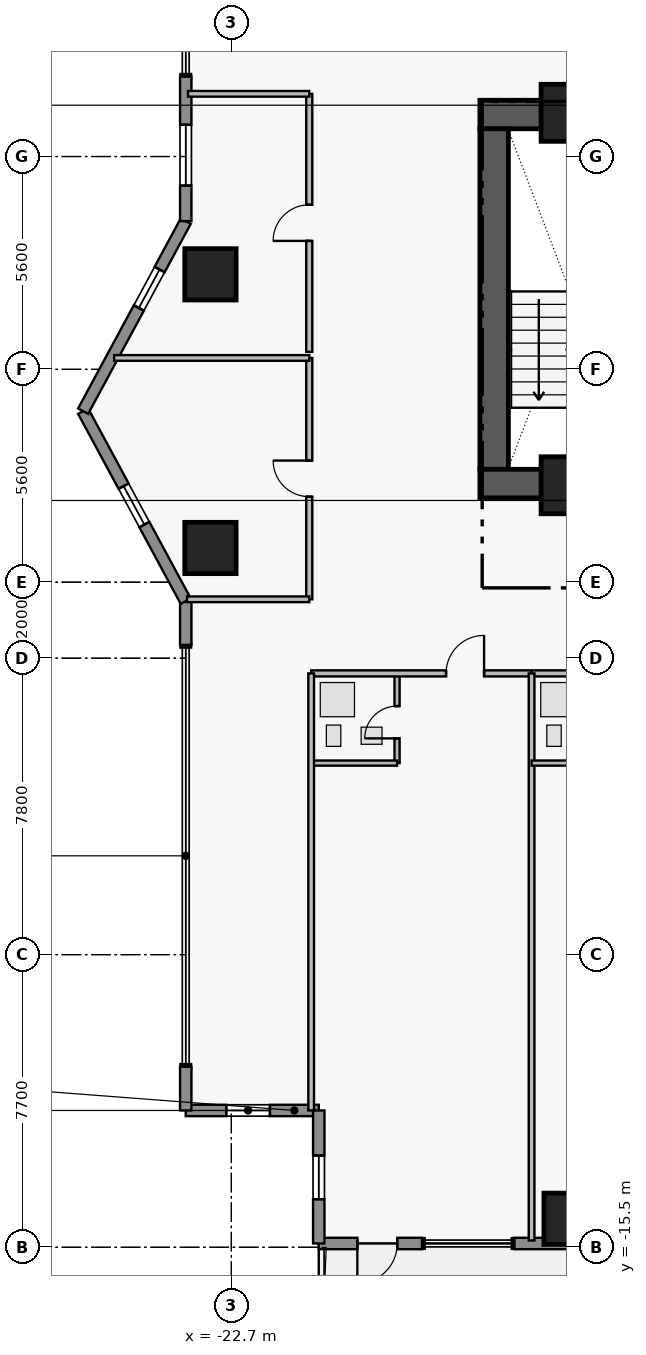
"""IFC4 building model, lengths in metres.
Left out: names, types, materials, properties, quantities, classifications, styles, units other than length and angle.
Written with IfcOpenShell. Run it as: python <this file> out.ifc"""

import sys

from ifc_helpers import new_model, si_unit, direction, frame, frame_2d, origin, origin_2d, place, context, subcontext, project, spatial, rectangle, extrude, element, fill, save


model = new_model("IFC4")
c1 = context("Model", 3, precision=1e-05, world=origin(), true_north=direction((0.0, 1.0)))
c2 = subcontext(c1, "Body", "Model", "MODEL_VIEW")
j1 = project(units=[si_unit("LENGTHUNIT", "METRE"), si_unit("PLANEANGLEUNIT", "RADIAN")], contexts=[c1])
p1 = place(None, origin())
s1 = spatial("IfcSite", under=j1, at=p1, CompositionType="ELEMENT")
p2 = place(p1, origin())
s2 = spatial("IfcBuilding", under=s1, at=p2, CompositionType="ELEMENT")
p3 = place(p2, frame((0.0, 0.0, 150.4)))
s3 = spatial("IfcBuildingStorey", under=s2, at=p3, CompositionType="ELEMENT", Elevation=150.4)
p4 = place(p3, frame((-16.16, 14.305, 0.0), z_axis=(0.0, 0.0, 1.0), x_axis=(1.0, 0.0, 0.0)))
e1 = element("IfcWall", 1, at=p4, inside=s3, PredefinedType="SHEAR", context=c2, shape_type="SweptSolid", body=[
    extrude(rectangle(XDim=4.56, YDim=0.75, at=frame_2d((2.28, 0.0))), origin(), (0.0, 0.0, 1.0), 3.46),
])
p5 = place(p3, frame((-15.785, 4.97, 0.0), z_axis=(0.0, 0.0, 1.0), x_axis=(0.0, 1.0, 0.0)))
e2 = element("IfcWall", 2, at=p5, inside=s3, PredefinedType="SHEAR", context=c2, shape_type="SweptSolid", body=[
    extrude(rectangle(XDim=8.96, YDim=0.75, at=frame_2d((4.48, 0.0))), origin(), (0.0, 0.0, 1.0), 3.46),
])
p6 = place(p3, frame((-16.16, 4.595, 0.0), z_axis=(0.0, 0.0, 1.0), x_axis=(1.0, 0.0, 0.0)))
e3 = element("IfcWall", 3, at=p6, inside=s3, PredefinedType="SHEAR", context=c2, shape_type="SweptSolid", body=[
    extrude(rectangle(XDim=4.56, YDim=0.75, at=frame_2d((2.28, 0.0))), origin(), (0.0, 0.0, 1.0), 3.46),
])
for number, where, z_axis, x_axis in (
    (4, (-13.8, 14.35, 0.0), (0.0, 0.0, 1.0), (1.0, 0.0, 0.0)),
    (5, (-13.8, 4.55, 0.0), (0.0, 0.0, 1.0), (1.0, 0.0, 0.0)),
):
    element("IfcColumn", number, at=place(p3, frame(where, z_axis=z_axis, x_axis=x_axis)), inside=s3, PredefinedType="COLUMN", context=c2, shape_type="SweptSolid", body=[
        extrude(rectangle(XDim=1.5, YDim=1.5, at=origin_2d()), origin(), (0.0, 0.0, 1.0), 3.65),
    ])
for number, where, z_axis, x_axis in (
    (6, (-13.8, -14.75, 0.0), (0.0, 0.0, 1.0), (1.0, 0.0, 0.0)),
    (7, (-23.25, 2.9, 0.0), (0.0, 0.0, 1.0), (1.0, 0.0, 0.0)),
    (8, (-23.25, 10.1, 0.0), (0.0, 0.0, 1.0), (1.0, 0.0, 0.0)),
):
    element("IfcColumn", number, at=place(p3, frame(where, z_axis=z_axis, x_axis=x_axis)), inside=s3, PredefinedType="COLUMN", context=c2, shape_type="SweptSolid", body=[
        extrude(rectangle(XDim=1.35, YDim=1.35, at=origin_2d()), origin(), (0.0, 0.0, 1.0), 3.65),
    ])
p7 = place(p3, frame((-20.4, -11.9, 0.0), z_axis=(0.0, 0.0, 1.0), x_axis=(-1.0, 0.0, 0.0)))
e9 = element("IfcWall", 9, at=p7, inside=s3, PredefinedType="STANDARD", context=c2, shape_type="SweptSolid", body=[
    extrude(rectangle(XDim=3.5, YDim=0.3, at=frame_2d((1.75, 0.0))), origin(), (0.0, 0.0, 1.0), 3.43),
])
p8 = place(p7, frame((1.285, 0.0, 1.25)))
e10 = element("IfcOpeningElement", 10, at=p8, cuts=e9, PredefinedType="OPENING", context=c2, shape_type="SweptSolid", body=[
    extrude(rectangle(XDim=1.15, YDim=1.55, at=frame_2d((0.575, 0.775))), frame((0.0, 0.16, 0.0), z_axis=(0.0, -1.0, 0.0), x_axis=(1.0, 0.0, 0.0)), (0.0, 0.0, 1.0), 0.32),
])
for number, where, z_axis, x_axis in (
    (11, (-23.9, -11.9, 0.0), (0.0, 0.0, 1.0), (0.0, 1.0, 0.0)),
    (12, (-23.9, 0.35, 0.0), (0.0, 0.0, 1.0), (0.0, 1.0, 0.0)),
):
    element("IfcWall", number, at=place(p3, frame(where, z_axis=z_axis, x_axis=x_axis)), inside=s3, PredefinedType="STANDARD", context=c2, shape_type="SweptSolid", body=[
        extrude(rectangle(XDim=1.15, YDim=0.3, at=frame_2d((0.575, 0.0))), origin(), (0.0, 0.0, 1.0), 3.43),
    ])
p9 = place(p3, frame((-23.9, 1.5, 0.0), z_axis=(0.0, 0.0, 1.0), x_axis=(-0.475175525499, 0.879891027325, 0.0)))
e13 = element("IfcWall", 13, at=p9, inside=s3, PredefinedType="STANDARD", context=c2, shape_type="SweptSolid", body=[
    extrude(rectangle(XDim=5.683, YDim=0.3, at=frame_2d((2.841, 0.0))), origin(), (0.0, 0.0, 1.0), 3.43),
])
p10 = place(p9, frame((2.29, 0.0, 1.25)))
e14 = element("IfcOpeningElement", 14, at=p10, cuts=e13, PredefinedType="OPENING", context=c2, shape_type="SweptSolid", body=[
    extrude(rectangle(XDim=1.15, YDim=1.55, at=frame_2d((0.575, 0.775))), frame((0.0, 0.16, 0.0), z_axis=(0.0, -1.0, 0.0), x_axis=(1.0, 0.0, 0.0)), (0.0, 0.0, 1.0), 0.32),
])
p11 = place(p3, frame((-26.6, 6.5, 0.0), z_axis=(0.0, 0.0, 1.0), x_axis=(0.475175525499, 0.879891027325, 0.0)))
e15 = element("IfcWall", 15, at=p11, inside=s3, PredefinedType="STANDARD", context=c2, shape_type="SweptSolid", body=[
    extrude(rectangle(XDim=5.683, YDim=0.3, at=frame_2d((2.841, 0.0))), origin(), (0.0, 0.0, 1.0), 3.43),
])
p12 = place(p11, frame((3.086, 0.0, 1.25)))
e16 = element("IfcOpeningElement", 16, at=p12, cuts=e15, PredefinedType="OPENING", context=c2, shape_type="SweptSolid", body=[
    extrude(rectangle(XDim=1.15, YDim=1.55, at=frame_2d((0.575, 0.775))), frame((0.0, 0.16, 0.0), z_axis=(0.0, -1.0, 0.0), x_axis=(1.0, 0.0, 0.0)), (0.0, 0.0, 1.0), 0.32),
])
p13 = place(p3, frame((-23.9, 11.5, 0.0), z_axis=(0.0, 0.0, 1.0), x_axis=(0.0, 1.0, 0.0)))
e17 = element("IfcWall", 17, at=p13, inside=s3, PredefinedType="STANDARD", context=c2, shape_type="SweptSolid", body=[
    extrude(rectangle(XDim=3.8, YDim=0.3, at=frame_2d((1.9, 0.0))), origin(), (0.0, 0.0, 1.0), 3.43),
])
p14 = place(p13, frame((0.935, 0.0, 0.85)))
e18 = element("IfcOpeningElement", 18, at=p14, cuts=e17, PredefinedType="OPENING", context=c2, shape_type="SweptSolid", body=[
    extrude(rectangle(XDim=1.6, YDim=1.8, at=frame_2d((0.8, 0.9))), frame((0.0, 0.16, 0.0), z_axis=(0.0, -1.0, 0.0), x_axis=(1.0, 0.0, 0.0)), (0.0, 0.0, 1.0), 0.32),
])
p15 = place(p3, frame((-12.88, -15.4, 0.0), z_axis=(0.0, 0.0, 1.0), x_axis=(-1.0, 0.0, 0.0)))
e19 = element("IfcWall", 19, at=p15, inside=s3, PredefinedType="STANDARD", context=c2, shape_type="SweptSolid", body=[
    extrude(rectangle(XDim=2.37, YDim=0.3, at=frame_2d((1.185, 0.0))), origin(), (0.0, 0.0, 1.0), 3.43),
])
p16 = place(p3, frame((-17.685, -15.4, 0.0), z_axis=(0.0, 0.0, 1.0), x_axis=(-1.0, 0.0, 0.0)))
e20 = element("IfcWall", 20, at=p16, inside=s3, PredefinedType="STANDARD", context=c2, shape_type="SweptSolid", body=[
    extrude(rectangle(XDim=2.715, YDim=0.3, at=frame_2d((1.357, 0.0))), origin(), (0.0, 0.0, 1.0), 3.43),
])
p17 = place(p16, frame((0.65, 0.0, 0.0)))
e21 = element("IfcOpeningElement", 21, at=p17, cuts=e20, PredefinedType="OPENING", context=c2, shape_type="SweptSolid", body=[
    extrude(rectangle(XDim=1.05, YDim=2.2, at=frame_2d((0.525, 1.1))), frame((0.0, 0.16, 0.0), z_axis=(0.0, -1.0, 0.0), x_axis=(1.0, 0.0, 0.0)), (0.0, 0.0, 1.0), 0.32),
])
p18 = place(p3, frame((-20.4, -15.4, 0.0), z_axis=(0.0, 0.0, 1.0), x_axis=(0.0, 1.0, 0.0)))
e22 = element("IfcWall", 22, at=p18, inside=s3, PredefinedType="STANDARD", context=c2, shape_type="SweptSolid", body=[
    extrude(rectangle(XDim=3.5, YDim=0.3, at=frame_2d((1.75, 0.0))), origin(), (0.0, 0.0, 1.0), 3.43),
])
p19 = place(p18, frame((1.165, 0.0, 1.25)))
e23 = element("IfcOpeningElement", 23, at=p19, cuts=e22, PredefinedType="OPENING", context=c2, shape_type="SweptSolid", body=[
    extrude(rectangle(XDim=1.15, YDim=1.55, at=frame_2d((0.575, 0.775))), frame((0.0, 0.16, 0.0), z_axis=(0.0, -1.0, 0.0), x_axis=(1.0, 0.0, 0.0)), (0.0, 0.0, 1.0), 0.32),
])
p20 = place(p3, frame((-18.34, -2.76, 0.0), z_axis=(0.0, 0.0, 1.0), x_axis=(0.0, 1.0, 0.0)))
e24 = element("IfcWall", 24, at=p20, inside=s3, PredefinedType="PLUMBINGWALL", context=c2, shape_type="SweptSolid", body=[
    extrude(rectangle(XDim=2.36, YDim=0.135, at=frame_2d((1.18, 0.0))), origin(), (0.0, 0.0, 1.0), 3.43),
])
p21 = place(p20, frame((0.65, 0.0, 0.0)))
e25 = element("IfcOpeningElement", 25, at=p21, cuts=e24, PredefinedType="OPENING", context=c2, shape_type="SweptSolid", body=[
    extrude(rectangle(XDim=0.85, YDim=2.1, at=frame_2d((0.425, 1.05))), frame((0.0, 0.077, 0.0), z_axis=(0.0, -1.0, 0.0), x_axis=(1.0, 0.0, 0.0)), (0.0, 0.0, 1.0), 0.155),
])
p22 = place(p3, frame((-20.6, -0.4, 0.0), z_axis=(0.0, 0.0, 1.0), x_axis=(1.0, 0.0, 0.0)))
e26 = element("IfcWall", 26, at=p22, inside=s3, PredefinedType="PARTITIONING", context=c2, shape_type="SweptSolid", body=[
    extrude(rectangle(XDim=5.8, YDim=0.16, at=frame_2d((2.9, 0.0))), origin(), (0.0, 0.0, 1.0), 3.43),
])
p23 = place(p22, frame((3.55, 0.0, 0.0)))
e27 = element("IfcOpeningElement", 27, at=p23, cuts=e26, PredefinedType="OPENING", context=c2, shape_type="SweptSolid", body=[
    extrude(rectangle(XDim=1.0, YDim=2.15, at=frame_2d((0.5, 1.075))), frame((0.0, 0.09, 0.0), z_axis=(0.0, -1.0, 0.0), x_axis=(1.0, 0.0, 0.0)), (0.0, 0.0, 1.0), 0.18),
])
p24 = place(p3, frame((-14.8, -0.4, 0.0), z_axis=(0.0, 0.0, 1.0), x_axis=(1.0, 0.0, 0.0)))
e28 = element("IfcWall", 28, at=p24, inside=s3, PredefinedType="PARTITIONING", context=c2, shape_type="SweptSolid", body=[
    extrude(rectangle(XDim=5.8, YDim=0.16, at=frame_2d((2.9, 0.0))), origin(), (0.0, 0.0, 1.0), 3.43),
])
p25 = place(p24, frame((3.55, 0.0, 0.0)))
e29 = element("IfcOpeningElement", 29, at=p25, cuts=e28, PredefinedType="OPENING", context=c2, shape_type="SweptSolid", body=[
    extrude(rectangle(XDim=1.0, YDim=2.15, at=frame_2d((0.5, 1.075))), frame((0.0, 0.09, 0.0), z_axis=(0.0, -1.0, 0.0), x_axis=(1.0, 0.0, 0.0)), (0.0, 0.0, 1.0), 0.18),
])
p26 = place(p3, frame((-20.65, 1.55, 0.0), z_axis=(0.0, 0.0, 1.0), x_axis=(0.0, 1.0, 0.0)))
e30 = element("IfcWall", 30, at=p26, inside=s3, PredefinedType="PARTITIONING", context=c2, shape_type="SweptSolid", body=[
    extrude(rectangle(XDim=6.35, YDim=0.16, at=frame_2d((3.175, 0.0))), origin(), (0.0, 0.0, 1.0), 3.43),
])
p27 = place(p26, frame((2.7, 0.0, 0.0)))
e31 = element("IfcOpeningElement", 31, at=p27, cuts=e30, PredefinedType="OPENING", context=c2, shape_type="SweptSolid", body=[
    extrude(rectangle(XDim=0.95, YDim=2.15, at=frame_2d((0.475, 1.075))), frame((0.0, 0.09, 0.0), z_axis=(0.0, -1.0, 0.0), x_axis=(1.0, 0.0, 0.0)), (0.0, 0.0, 1.0), 0.18),
])
p28 = place(p3, frame((-20.65, 8.06, 0.0), z_axis=(0.0, 0.0, 1.0), x_axis=(0.0, 1.0, 0.0)))
e32 = element("IfcWall", 32, at=p28, inside=s3, PredefinedType="PARTITIONING", context=c2, shape_type="SweptSolid", body=[
    extrude(rectangle(XDim=6.79, YDim=0.16, at=frame_2d((3.395, 0.0))), origin(), (0.0, 0.0, 1.0), 3.43),
])
p29 = place(p28, frame((2.92, 0.0, 0.0)))
e33 = element("IfcOpeningElement", 33, at=p29, cuts=e32, PredefinedType="OPENING", context=c2, shape_type="SweptSolid", body=[
    extrude(rectangle(XDim=0.95, YDim=2.15, at=frame_2d((0.475, 1.075))), frame((0.0, 0.09, 0.0), z_axis=(0.0, -1.0, 0.0), x_axis=(1.0, 0.0, 0.0)), (0.0, 0.0, 1.0), 0.18),
])
p30 = place(p3, frame((-20.6, -2.76, 0.0), z_axis=(0.0, 0.0, 1.0), x_axis=(1.0, 0.0, 0.0)))
e34 = element("IfcWall", 34, at=p30, inside=s3, PredefinedType="PLUMBINGWALL", context=c2, shape_type="SweptSolid", body=[
    extrude(rectangle(XDim=2.26, YDim=0.135, at=frame_2d((1.13, 0.0))), origin(), (0.0, 0.0, 1.0), 3.43),
])
p31 = place(p3, frame((-20.6, -11.9, 0.0), z_axis=(0.0, 0.0, 1.0), x_axis=(0.0, 1.0, 0.0)))
e35 = element("IfcWall", 35, at=p31, inside=s3, PredefinedType="PARTITIONING", context=c2, shape_type="SweptSolid", body=[
    extrude(rectangle(XDim=11.5, YDim=0.15, at=frame_2d((5.75, 0.0))), origin(), (0.0, 0.0, 1.0), 3.43),
])
p32 = place(p3, frame((-14.8, -15.32, 0.0), z_axis=(0.0, 0.0, 1.0), x_axis=(0.0, 1.0, 0.0)))
e36 = element("IfcWall", 36, at=p32, inside=s3, PredefinedType="PARTITIONING", context=c2, shape_type="SweptSolid", body=[
    extrude(rectangle(XDim=14.92, YDim=0.15, at=frame_2d((7.46, 0.0))), origin(), (0.0, 0.0, 1.0), 3.43),
])
p33 = place(p3, frame((-14.8, -2.76, 0.0), z_axis=(0.0, 0.0, 1.0), x_axis=(1.0, 0.0, 0.0)))
e37 = element("IfcWall", 37, at=p33, inside=s3, PredefinedType="PLUMBINGWALL", context=c2, shape_type="SweptSolid", body=[
    extrude(rectangle(XDim=2.26, YDim=0.135, at=frame_2d((1.13, 0.0))), origin(), (0.0, 0.0, 1.0), 3.43),
])
p34 = place(p3, frame((-23.867, 1.55, 0.0), z_axis=(0.0, 0.0, 1.0), x_axis=(1.0, 0.0, 0.0)))
e38 = element("IfcWall", 38, at=p34, inside=s3, PredefinedType="PARTITIONING", context=c2, shape_type="SweptSolid", body=[
    extrude(rectangle(XDim=3.217, YDim=0.15, at=frame_2d((1.608, 0.0))), origin(), (0.0, 0.0, 1.0), 3.43),
])
p35 = place(p3, frame((-25.784, 7.9, 0.0), z_axis=(0.0, 0.0, 1.0), x_axis=(1.0, 0.0, 0.0)))
e39 = element("IfcWall", 39, at=p35, inside=s3, PredefinedType="PARTITIONING", context=c2, shape_type="SweptSolid", body=[
    extrude(rectangle(XDim=5.134, YDim=0.15, at=frame_2d((2.567, 0.0))), origin(), (0.0, 0.0, 1.0), 3.43),
])
p36 = place(p3, frame((-23.84, 14.85, 0.0), z_axis=(0.0, 0.0, 1.0), x_axis=(1.0, 0.0, 0.0)))
e40 = element("IfcWall", 40, at=p36, inside=s3, PredefinedType="PARTITIONING", context=c2, shape_type="SweptSolid", body=[
    extrude(rectangle(XDim=3.19, YDim=0.15, at=frame_2d((1.595, 0.0))), origin(), (0.0, 0.0, 1.0), 3.43),
])
p37 = place(p8, origin())
e41 = element("IfcWindow", 41, at=p37, inside=s3, PartitioningType="SINGLE_PANEL", PredefinedType="WINDOW", context=c2, shape_type="SweptSolid", body=[
    extrude(rectangle(XDim=1.15, YDim=1.55, at=frame_2d((0.575, 0.775))), frame((0.0, 0.03, 0.0), z_axis=(0.0, -1.0, 0.0), x_axis=(1.0, 0.0, 0.0)), (0.0, 0.0, 1.0), 0.06),
])
fill(e10, e41)
p38 = place(p10, origin())
e42 = element("IfcWindow", 42, at=p38, inside=s3, PartitioningType="SINGLE_PANEL", PredefinedType="WINDOW", context=c2, shape_type="SweptSolid", body=[
    extrude(rectangle(XDim=1.15, YDim=1.55, at=frame_2d((0.575, 0.775))), frame((0.0, 0.03, 0.0), z_axis=(0.0, -1.0, 0.0), x_axis=(1.0, 0.0, 0.0)), (0.0, 0.0, 1.0), 0.06),
])
fill(e14, e42)
p39 = place(p12, origin())
e43 = element("IfcWindow", 43, at=p39, inside=s3, PartitioningType="SINGLE_PANEL", PredefinedType="WINDOW", context=c2, shape_type="SweptSolid", body=[
    extrude(rectangle(XDim=1.15, YDim=1.55, at=frame_2d((0.575, 0.775))), frame((0.0, 0.03, 0.0), z_axis=(0.0, -1.0, 0.0), x_axis=(1.0, 0.0, 0.0)), (0.0, 0.0, 1.0), 0.06),
])
fill(e16, e43)
p40 = place(p14, origin())
e44 = element("IfcWindow", 44, at=p40, inside=s3, PartitioningType="SINGLE_PANEL", PredefinedType="WINDOW", context=c2, shape_type="SweptSolid", body=[
    extrude(rectangle(XDim=1.6, YDim=1.8, at=frame_2d((0.8, 0.9))), frame((0.0, 0.03, 0.0), z_axis=(0.0, -1.0, 0.0), x_axis=(1.0, 0.0, 0.0)), (0.0, 0.0, 1.0), 0.06),
])
fill(e18, e44)
p41 = place(p17, origin())
e45 = element("IfcDoor", 45, at=p41, inside=s3, OperationType="SINGLE_SWING_RIGHT", PredefinedType="DOOR", context=c2, shape_type="SweptSolid", body=[
    extrude(rectangle(XDim=1.05, YDim=2.2, at=frame_2d((0.525, 1.1))), frame((0.0, 0.025, 0.0), z_axis=(0.0, -1.0, 0.0), x_axis=(1.0, 0.0, 0.0)), (0.0, 0.0, 1.0), 0.05),
])
fill(e21, e45)
p42 = place(p19, origin())
e46 = element("IfcWindow", 46, at=p42, inside=s3, PartitioningType="SINGLE_PANEL", PredefinedType="WINDOW", context=c2, shape_type="SweptSolid", body=[
    extrude(rectangle(XDim=1.15, YDim=1.55, at=frame_2d((0.575, 0.775))), frame((0.0, 0.03, 0.0), z_axis=(0.0, -1.0, 0.0), x_axis=(1.0, 0.0, 0.0)), (0.0, 0.0, 1.0), 0.06),
])
fill(e23, e46)
p43 = place(p21, origin())
e47 = element("IfcDoor", 47, at=p43, inside=s3, OperationType="SINGLE_SWING_LEFT", PredefinedType="DOOR", context=c2, shape_type="SweptSolid", body=[
    extrude(rectangle(XDim=0.85, YDim=2.1, at=frame_2d((0.425, 1.05))), frame((0.0, 0.025, 0.0), z_axis=(0.0, -1.0, 0.0), x_axis=(1.0, 0.0, 0.0)), (0.0, 0.0, 1.0), 0.05),
])
fill(e25, e47)
p44 = place(p23, origin())
e48 = element("IfcDoor", 48, at=p44, inside=s3, OperationType="SINGLE_SWING_RIGHT", PredefinedType="DOOR", context=c2, shape_type="SweptSolid", body=[
    extrude(rectangle(XDim=1.0, YDim=2.15, at=frame_2d((0.5, 1.075))), frame((0.0, 0.025, 0.0), z_axis=(0.0, -1.0, 0.0), x_axis=(1.0, 0.0, 0.0)), (0.0, 0.0, 1.0), 0.05),
])
fill(e27, e48)
p45 = place(p27, origin())
e49 = element("IfcDoor", 49, at=p45, inside=s3, OperationType="SINGLE_SWING_RIGHT", PredefinedType="DOOR", context=c2, shape_type="SweptSolid", body=[
    extrude(rectangle(XDim=0.95, YDim=2.15, at=frame_2d((0.475, 1.075))), frame((0.0, 0.025, 0.0), z_axis=(0.0, -1.0, 0.0), x_axis=(1.0, 0.0, 0.0)), (0.0, 0.0, 1.0), 0.05),
])
fill(e31, e49)
p46 = place(p29, origin())
e50 = element("IfcDoor", 50, at=p46, inside=s3, OperationType="SINGLE_SWING_LEFT", PredefinedType="DOOR", context=c2, shape_type="SweptSolid", body=[
    extrude(rectangle(XDim=0.95, YDim=2.15, at=frame_2d((0.475, 1.075))), frame((0.0, 0.025, 0.0), z_axis=(0.0, -1.0, 0.0), x_axis=(1.0, 0.0, 0.0)), (0.0, 0.0, 1.0), 0.05),
])
fill(e33, e50)
save(model, sys.argv[1])
